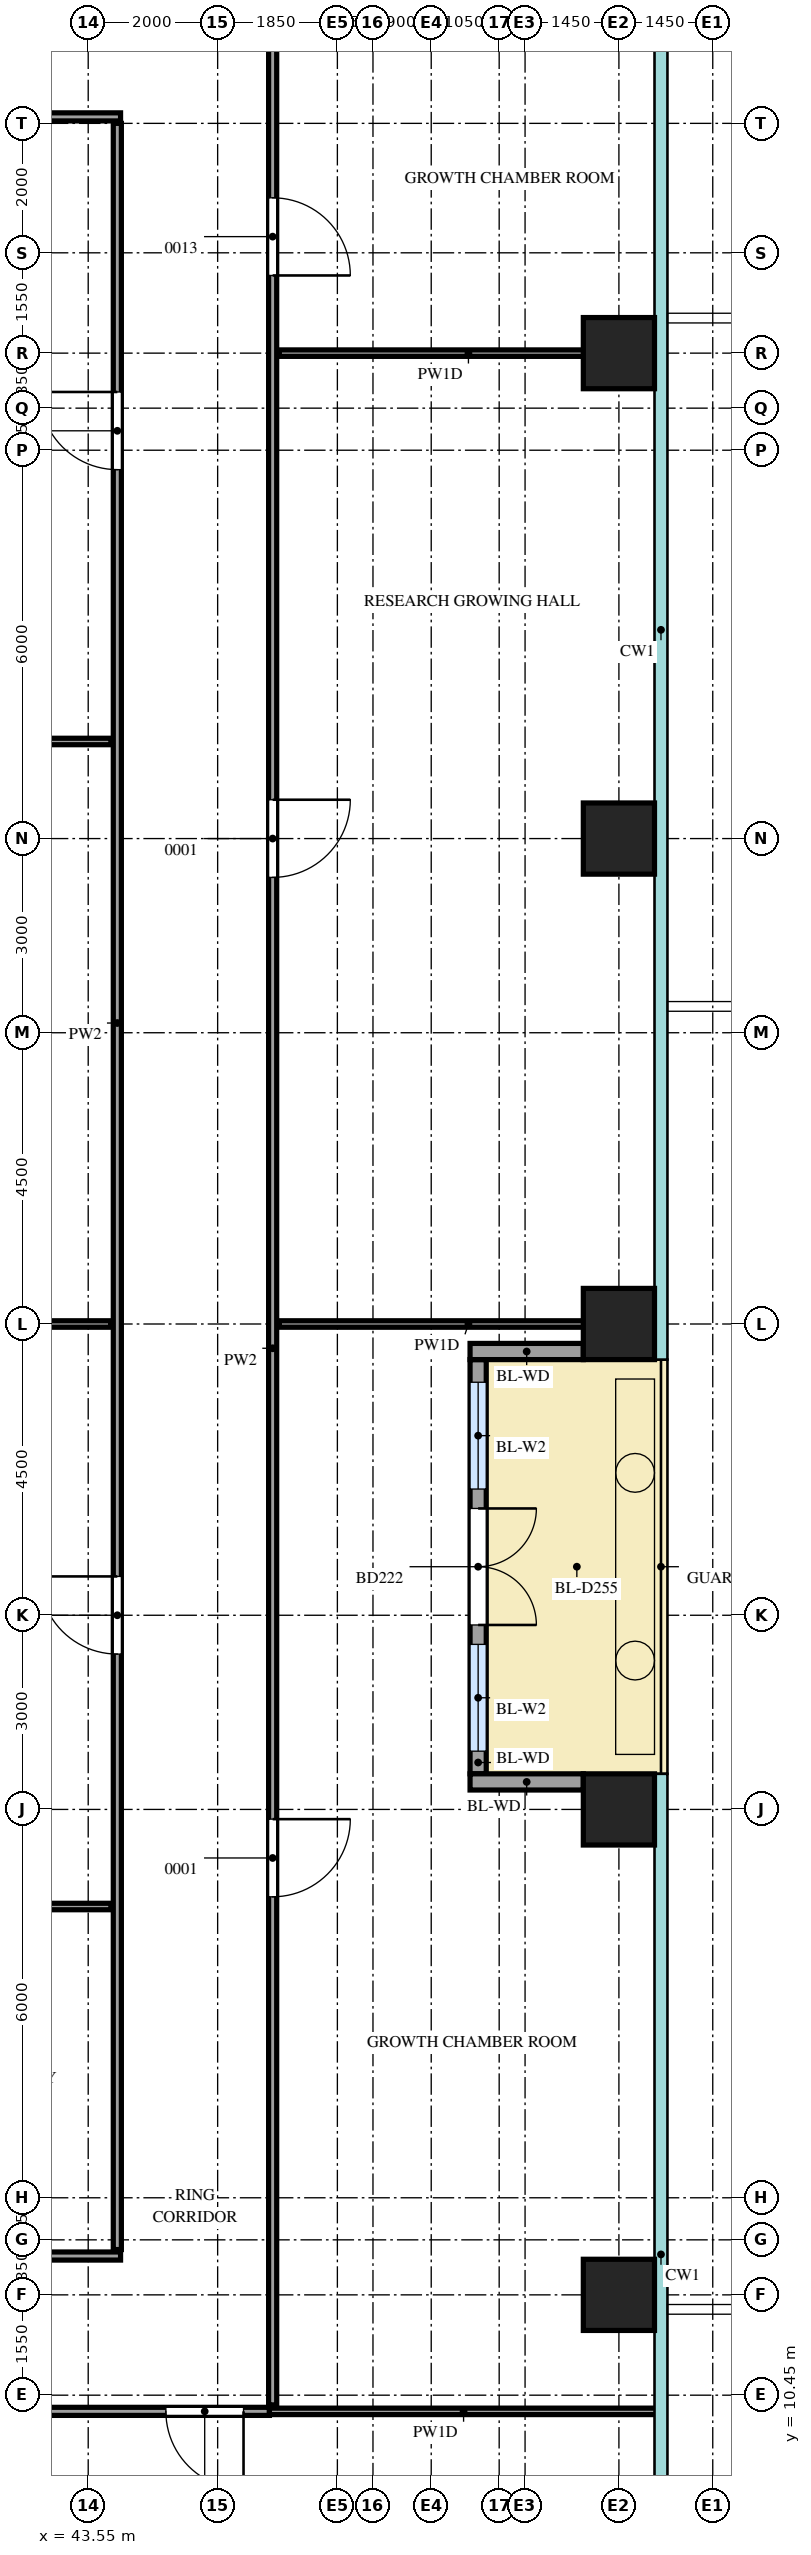
"""IFC4 building model, lengths in metres.
Left out: names, types, materials, properties, quantities, classifications, styles, units other than length and angle.
Written with IfcOpenShell. Run it as: python <this file> out.ifc"""

import sys

from ifc_helpers import new_model, si_unit, direction, frame, frame_2d, origin, origin_2d, place, context, subcontext, project, spatial, rectangle, extrude, source, transform, mapped, element, fill, save


model = new_model("IFC4")
c1 = context("Model", 3, precision=1e-05, world=origin(), true_north=direction((0.0, 1.0)))
c2 = subcontext(c1, "Body", "Model", "MODEL_VIEW")
j1 = project(units=[si_unit("LENGTHUNIT", "METRE"), si_unit("PLANEANGLEUNIT", "RADIAN")], contexts=[c1])
p1 = place(None, origin())
s1 = spatial("IfcSite", under=j1, at=p1, CompositionType="ELEMENT")
p2 = place(p1, origin())
s2 = spatial("IfcBuilding", under=s1, at=p2, CompositionType="ELEMENT")
p3 = place(p2, frame((0.0, 0.0, 105.9)))
s3 = spatial("IfcBuildingStorey", under=s2, at=p3, CompositionType="ELEMENT", Elevation=105.9)
m1 = source(origin(), c2, "Body", "SweptSolid", [
    extrude(rectangle(XDim=1.1, YDim=1.1, at=origin_2d()), origin(), (0.0, 0.0, 1.0), 4.1),
])
for number, where, z_axis, x_axis in (
    (1, (51.75, 12.0, 0.0), (0.0, 0.0, 1.0), (1.0, 0.0, 0.0)),
    (2, (51.75, 19.5, 0.0), (0.0, 0.0, 1.0), (1.0, 0.0, 0.0)),
    (3, (51.75, 27.0, 0.0), (0.0, 0.0, 1.0), (1.0, 0.0, 0.0)),
    (4, (51.75, 34.5, 0.0), (0.0, 0.0, 1.0), (1.0, 0.0, 0.0)),
    (5, (51.75, 42.0, 0.0), (0.0, 0.0, 1.0), (1.0, 0.0, 0.0)),
):
    element("IfcColumn", number, at=place(p3, frame(where, z_axis=z_axis, x_axis=x_axis)), inside=s3, PredefinedType="COLUMN", context=c2, shape_type="MappedRepresentation", body=[
        mapped(m1, transform((0.0, 0.0, 0.0))),
    ])
m2 = source(origin(), c2, "Body", "SweptSolid", [
    extrude(rectangle(XDim=6.4, YDim=0.25, at=frame_2d((3.2, 0.0))), origin(), (0.0, 0.0, 1.0), 3.55),
])
p4 = place(p3, frame((49.575, 20.05, 0.0), z_axis=(0.0, 0.0, 1.0), x_axis=(0.0, 1.0, 0.0)))
e6 = element("IfcWall", 6, at=p4, inside=s3, PredefinedType="SOLIDWALL", context=c2, shape_type="MappedRepresentation", body=[
    mapped(m2, transform((0.0, 0.0, 0.0))),
])
m3 = source(origin(), c2, "Body", "SweptSolid", [
    extrude(rectangle(XDim=1.65, YDim=2.4, at=frame_2d((0.825, 1.2))), frame((0.0, 0.135, 0.0), z_axis=(0.0, -1.0, 0.0), x_axis=(1.0, 0.0, 0.0)), (0.0, 0.0, 1.0), 0.27),
])
p5 = place(p4, frame((0.35, 0.0, 0.0)))
e7 = element("IfcOpeningElement", 7, at=p5, cuts=e6, PredefinedType="OPENING", context=c2, shape_type="MappedRepresentation", body=[
    mapped(m3, transform((0.0, 0.0, 0.0))),
])
p6 = place(p4, frame((4.4, 0.0, 0.0)))
e8 = element("IfcOpeningElement", 8, at=p6, cuts=e6, PredefinedType="OPENING", context=c2, shape_type="MappedRepresentation", body=[
    mapped(m3, transform((0.0, 0.0, 0.0))),
])
m4 = source(origin(), c2, "Body", "SweptSolid", [
    extrude(rectangle(XDim=1.8, YDim=2.4, at=frame_2d((0.9, 1.2))), frame((0.0, 0.135, 0.0), z_axis=(0.0, -1.0, 0.0), x_axis=(1.0, 0.0, 0.0)), (0.0, 0.0, 1.0), 0.27),
])
p7 = place(p4, frame((2.3, 0.0, 0.0)))
e9 = element("IfcOpeningElement", 9, at=p7, cuts=e6, PredefinedType="OPENING", context=c2, shape_type="MappedRepresentation", body=[
    mapped(m4, transform((0.0, 0.0, 0.0))),
])
m5 = source(origin(), c2, "Body", "SweptSolid", [
    extrude(rectangle(XDim=1.75, YDim=0.25, at=frame_2d((0.875, 0.0))), origin(), (0.0, 0.0, 1.0), 3.55),
])
for number, where, z_axis, x_axis in (
    (10, (51.2, 19.925, 0.0), (0.0, 0.0, 1.0), (-1.0, 0.0, 0.0)),
    (11, (51.2, 26.575, 0.0), (0.0, 0.0, 1.0), (-1.0, 0.0, 0.0)),
):
    element("IfcWall", number, at=place(p3, frame(where, z_axis=z_axis, x_axis=x_axis)), inside=s3, PredefinedType="SOLIDWALL", context=c2, shape_type="MappedRepresentation", body=[
        mapped(m5, transform((0.0, 0.0, 0.0))),
    ])
m6 = source(origin(), c2, "Body", "SweptSolid", [
    extrude(rectangle(XDim=20.0, YDim=0.125, at=frame_2d((10.0, 0.0))), origin(), (0.0, 0.0, 1.0), 4.2),
])
p8 = place(p3, frame((26.35, 10.2, 0.0), z_axis=(0.0, 0.0, 1.0), x_axis=(1.0, 0.0, 0.0)))
e12 = element("IfcWall", 12, at=p8, inside=s3, PredefinedType="PARTITIONING", context=c2, shape_type="MappedRepresentation", body=[
    mapped(m6, transform((0.0, 0.0, 0.0))),
])
m7 = source(origin(), c2, "Body", "SweptSolid", [
    extrude(rectangle(XDim=0.9, YDim=2.1, at=frame_2d((0.45, 1.05))), frame((0.0, 0.073, 0.0), z_axis=(0.0, -1.0, 0.0), x_axis=(1.0, 0.0, 0.0)), (0.0, 0.0, 1.0), 0.145),
])
p9 = place(p8, frame((3.8, 0.0, 0.0)))
e13 = element("IfcOpeningElement", 13, at=p9, cuts=e12, PredefinedType="OPENING", context=c2, shape_type="MappedRepresentation", body=[
    mapped(m7, transform((0.0, 0.0, 0.0))),
])
p10 = place(p8, frame((11.3, 0.0, 0.0)))
e14 = element("IfcOpeningElement", 14, at=p10, cuts=e12, PredefinedType="OPENING", context=c2, shape_type="MappedRepresentation", body=[
    mapped(m7, transform((0.0, 0.0, 0.0))),
])
m8 = source(origin(), c2, "Body", "SweptSolid", [
    extrude(rectangle(XDim=1.2, YDim=2.1, at=frame_2d((0.6, 1.05))), frame((0.0, 0.073, 0.0), z_axis=(0.0, -1.0, 0.0), x_axis=(1.0, 0.0, 0.0)), (0.0, 0.0, 1.0), 0.145),
])
p11 = place(p8, frame((18.4, 0.0, 0.0)))
e15 = element("IfcOpeningElement", 15, at=p11, cuts=e12, PredefinedType="OPENING", context=c2, shape_type="MappedRepresentation", body=[
    mapped(m8, transform((0.0, 0.0, 0.0))),
])
m9 = source(origin(), c2, "Body", "SweptSolid", [
    extrude(rectangle(XDim=6.0, YDim=0.1, at=frame_2d((3.0, 0.0))), origin(), (0.0, 0.0, 1.0), 4.2),
])
p12 = place(p3, frame((46.35, 10.2, 0.0), z_axis=(0.0, 0.0, 1.0), x_axis=(1.0, 0.0, 0.0)))
e16 = element("IfcWall", 16, at=p12, inside=s3, PredefinedType="PARTITIONING", context=c2, shape_type="MappedRepresentation", body=[
    mapped(m9, transform((0.0, 0.0, 0.0))),
])
m10 = source(origin(), c2, "Body", "SweptSolid", [
    extrude(rectangle(XDim=37.65, YDim=0.125, at=frame_2d((18.825, 0.0))), origin(), (0.0, 0.0, 1.0), 4.2),
])
p13 = place(p3, frame((46.4, 10.3, 0.0), z_axis=(0.0, 0.0, 1.0), x_axis=(0.0, 1.0, 0.0)))
e17 = element("IfcWall", 17, at=p13, inside=s3, PredefinedType="PARTITIONING", context=c2, shape_type="MappedRepresentation", body=[
    mapped(m10, transform((0.0, 0.0, 0.0))),
])
p14 = place(p13, frame((7.85, 0.0, 0.0)))
e18 = element("IfcOpeningElement", 18, at=p14, cuts=e17, PredefinedType="OPENING", context=c2, shape_type="MappedRepresentation", body=[
    mapped(m8, transform((0.0, 0.0, 0.0))),
])
p15 = place(p13, frame((23.6, 0.0, 0.0)))
e19 = element("IfcOpeningElement", 19, at=p15, cuts=e17, PredefinedType="OPENING", context=c2, shape_type="MappedRepresentation", body=[
    mapped(m8, transform((0.0, 0.0, 0.0))),
])
p16 = place(p13, frame((32.9, 0.0, 0.0)))
e20 = element("IfcOpeningElement", 20, at=p16, cuts=e17, PredefinedType="OPENING", context=c2, shape_type="MappedRepresentation", body=[
    mapped(m8, transform((0.0, 0.0, 0.0))),
])
m11 = source(origin(), c2, "Body", "SweptSolid", [
    extrude(rectangle(XDim=17.7, YDim=0.125, at=frame_2d((8.85, 0.0))), origin(), (0.0, 0.0, 1.0), 4.2),
])
p17 = place(p3, frame((26.35, 12.6, 0.0), z_axis=(0.0, 0.0, 1.0), x_axis=(1.0, 0.0, 0.0)))
e21 = element("IfcWall", 21, at=p17, inside=s3, PredefinedType="PARTITIONING", context=c2, shape_type="MappedRepresentation", body=[
    mapped(m11, transform((0.0, 0.0, 0.0))),
])
m12 = source(origin(), c2, "Body", "SweptSolid", [
    extrude(rectangle(XDim=32.85, YDim=0.125, at=frame_2d((16.425, 0.0))), origin(), (0.0, 0.0, 1.0), 4.2),
])
p18 = place(p3, frame((44.0, 12.7, 0.0), z_axis=(0.0, 0.0, 1.0), x_axis=(0.0, 1.0, 0.0)))
e22 = element("IfcWall", 22, at=p18, inside=s3, PredefinedType="PARTITIONING", context=c2, shape_type="MappedRepresentation", body=[
    mapped(m12, transform((0.0, 0.0, 0.0))),
])
p19 = place(p18, frame((9.2, 0.0, 0.0)))
e23 = element("IfcOpeningElement", 23, at=p19, cuts=e22, PredefinedType="OPENING", context=c2, shape_type="MappedRepresentation", body=[
    mapped(m8, transform((0.0, 0.0, 0.0))),
])
p20 = place(p18, frame((27.5, 0.0, 0.0)))
e24 = element("IfcOpeningElement", 24, at=p20, cuts=e22, PredefinedType="OPENING", context=c2, shape_type="MappedRepresentation", body=[
    mapped(m8, transform((0.0, 0.0, 0.0))),
])
m13 = source(origin(), c2, "Body", "SweptSolid", [
    extrude(rectangle(XDim=17.4, YDim=0.1, at=frame_2d((8.7, 0.0))), origin(), (0.0, 0.0, 1.0), 4.2),
])
for number, where, z_axis, x_axis in (
    (25, (26.5, 18.0, 0.0), (0.0, 0.0, 1.0), (1.0, 0.0, 0.0)),
    (26, (26.5, 27.0, 0.0), (0.0, 0.0, 1.0), (1.0, 0.0, 0.0)),
):
    element("IfcWall", number, at=place(p3, frame(where, z_axis=z_axis, x_axis=x_axis)), inside=s3, PredefinedType="PARTITIONING", context=c2, shape_type="MappedRepresentation", body=[
        mapped(m13, transform((0.0, 0.0, 0.0))),
    ])
m14 = source(origin(), c2, "Body", "SweptSolid", [
    extrude(rectangle(XDim=5.85, YDim=0.1, at=frame_2d((2.925, 0.0))), origin(), (0.0, 0.0, 1.0), 4.2),
])
p21 = place(p3, frame((46.5, 27.0, 0.0), z_axis=(0.0, 0.0, 1.0), x_axis=(1.0, 0.0, 0.0)))
e27 = element("IfcWall", 27, at=p21, inside=s3, PredefinedType="PARTITIONING", context=c2, shape_type="MappedRepresentation", body=[
    mapped(m14, transform((0.0, 0.0, 0.0))),
])
m15 = source(origin(), c2, "Body", "SweptSolid", [
    extrude(rectangle(XDim=13.35, YDim=0.1, at=frame_2d((6.675, 0.0))), origin(), (0.0, 0.0, 1.0), 4.2),
])
p22 = place(p3, frame((30.55, 36.0, 0.0), z_axis=(0.0, 0.0, 1.0), x_axis=(1.0, 0.0, 0.0)))
e28 = element("IfcWall", 28, at=p22, inside=s3, PredefinedType="PARTITIONING", context=c2, shape_type="MappedRepresentation", body=[
    mapped(m15, transform((0.0, 0.0, 0.0))),
])
p23 = place(p3, frame((46.5, 42.0, 0.0), z_axis=(0.0, 0.0, 1.0), x_axis=(1.0, 0.0, 0.0)))
e29 = element("IfcWall", 29, at=p23, inside=s3, PredefinedType="PARTITIONING", context=c2, shape_type="MappedRepresentation", body=[
    mapped(m14, transform((0.0, 0.0, 0.0))),
])
m16 = source(origin(), c2, "Body", "SweptSolid", [
    extrude(rectangle(XDim=13.5, YDim=0.125, at=frame_2d((6.75, 0.0))), origin(), (0.0, 0.0, 1.0), 4.2),
])
p24 = place(p3, frame((30.55, 45.65, 0.0), z_axis=(0.0, 0.0, 1.0), x_axis=(1.0, 0.0, 0.0)))
e30 = element("IfcWall", 30, at=p24, inside=s3, PredefinedType="PARTITIONING", context=c2, shape_type="MappedRepresentation", body=[
    mapped(m16, transform((0.0, 0.0, 0.0))),
])
m17 = source(origin(), c2, "Body", "SweptSolid", [
    extrude(rectangle(XDim=1.65, YDim=2.4, at=frame_2d((0.825, 1.2))), frame((0.0, 0.03, 0.0), z_axis=(0.0, -1.0, 0.0), x_axis=(1.0, 0.0, 0.0)), (0.0, 0.0, 1.0), 0.06),
])
p25 = place(p5, origin())
e31 = element("IfcWindow", 31, at=p25, inside=s3, PartitioningType="SINGLE_PANEL", PredefinedType="WINDOW", context=c2, shape_type="MappedRepresentation", body=[
    mapped(m17, transform((0.0, 0.0, 0.0))),
])
fill(e7, e31)
p26 = place(p6, origin())
e32 = element("IfcWindow", 32, at=p26, inside=s3, PartitioningType="SINGLE_PANEL", PredefinedType="WINDOW", context=c2, shape_type="MappedRepresentation", body=[
    mapped(m17, transform((0.0, 0.0, 0.0))),
])
fill(e8, e32)
m18 = source(origin(), c2, "Body", "SweptSolid", [
    extrude(rectangle(XDim=1.8, YDim=2.4, at=frame_2d((0.9, 1.2))), frame((0.0, 0.025, 0.0), z_axis=(0.0, -1.0, 0.0), x_axis=(1.0, 0.0, 0.0)), (0.0, 0.0, 1.0), 0.05),
])
p27 = place(p7, origin())
e33 = element("IfcDoor", 33, at=p27, inside=s3, OperationType="DOUBLE_DOOR_DOUBLE_SWING", PredefinedType="DOOR", context=c2, shape_type="MappedRepresentation", body=[
    mapped(m18, transform((0.0, 0.0, 0.0))),
])
fill(e9, e33)
m19 = source(origin(), c2, "Body", "SweptSolid", [
    extrude(rectangle(XDim=1.2, YDim=2.1, at=frame_2d((0.6, 1.05))), frame((0.0, 0.025, 0.0), z_axis=(0.0, -1.0, 0.0), x_axis=(1.0, 0.0, 0.0)), (0.0, 0.0, 1.0), 0.05),
])
p28 = place(p11, origin())
e34 = element("IfcDoor", 34, at=p28, inside=s3, OperationType="SINGLE_SWING_RIGHT", PredefinedType="DOOR", context=c2, shape_type="MappedRepresentation", body=[
    mapped(m19, transform((0.0, 0.0, 0.0))),
])
fill(e15, e34)
p29 = place(p19, origin())
e35 = element("IfcDoor", 35, at=p29, inside=s3, OperationType="SINGLE_SWING_LEFT", PredefinedType="DOOR", context=c2, shape_type="MappedRepresentation", body=[
    mapped(m19, transform((0.0, 0.0, 0.0))),
])
fill(e23, e35)
p30 = place(p20, origin())
e36 = element("IfcDoor", 36, at=p30, inside=s3, OperationType="SINGLE_SWING_LEFT", PredefinedType="DOOR", context=c2, shape_type="MappedRepresentation", body=[
    mapped(m19, transform((0.0, 0.0, 0.0))),
])
fill(e24, e36)
p31 = place(p14, origin())
e37 = element("IfcDoor", 37, at=p31, inside=s3, OperationType="SINGLE_SWING_RIGHT", PredefinedType="DOOR", context=c2, shape_type="MappedRepresentation", body=[
    mapped(m19, transform((0.0, 0.0, 0.0))),
])
fill(e18, e37)
p32 = place(p15, origin())
e38 = element("IfcDoor", 38, at=p32, inside=s3, OperationType="SINGLE_SWING_RIGHT", PredefinedType="DOOR", context=c2, shape_type="MappedRepresentation", body=[
    mapped(m19, transform((0.0, 0.0, 0.0))),
])
fill(e19, e38)
p33 = place(p16, origin())
e39 = element("IfcDoor", 39, at=p33, inside=s3, OperationType="SINGLE_SWING_LEFT", PredefinedType="DOOR", context=c2, shape_type="MappedRepresentation", body=[
    mapped(m19, transform((0.0, 0.0, 0.0))),
])
fill(e20, e39)
save(model, sys.argv[1])
